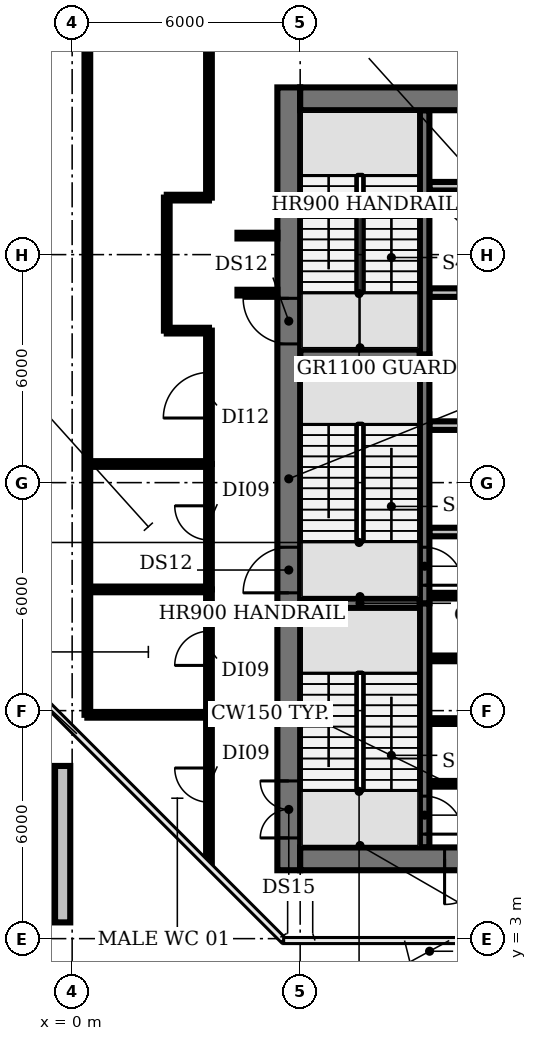
"""IFC4 building model, lengths in metres.
Left out: names, types, materials, properties, quantities, classifications, styles, units other than length and angle.
Written with IfcOpenShell. Run it as: python <this file> out.ifc"""

import sys

from ifc_helpers import new_model, si_unit, direction, frame, frame_2d, origin, place, context, subcontext, project, spatial, rectangle, extrude, element, fill, save


model = new_model("IFC4")
c1 = context("Model", 3, precision=1e-05, world=origin(), true_north=direction((0.0, 1.0)))
c2 = subcontext(c1, "Body", "Model", "MODEL_VIEW")
j1 = project(units=[si_unit("LENGTHUNIT", "METRE"), si_unit("PLANEANGLEUNIT", "RADIAN")], contexts=[c1])
p1 = place(None, origin())
s1 = spatial("IfcSite", under=j1, at=p1, CompositionType="ELEMENT")
p2 = place(p1, origin())
s2 = spatial("IfcBuilding", under=s1, at=p2, CompositionType="ELEMENT")
p3 = place(p2, frame((0.0, 0.0, 197.0)))
s3 = spatial("IfcBuildingStorey", under=s2, at=p3, CompositionType="ELEMENT", Elevation=197.0)
p4 = place(p3, frame((-0.25, 3.427, 0.0), z_axis=(0.0, 0.0, 1.0), x_axis=(0.0, 1.0, 0.0)))
e1 = element("IfcWall", 1, at=p4, inside=s3, PredefinedType="SOLIDWALL", context=c2, shape_type="SweptSolid", body=[
    extrude(rectangle(XDim=4.117, YDim=0.4, at=frame_2d((2.059, 0.0))), origin(), (0.0, 0.0, 1.0), 0.6),
])
for number, where, z_axis, x_axis in (
    (2, (9.4, 7.075, 0.0), (0.0, 0.0, 1.0), (1.0, 0.0, 0.0)),
    (3, (9.4, 8.725, 0.0), (0.0, 0.0, 1.0), (1.0, 0.0, 0.0)),
    (4, (9.4, 10.375, 0.0), (0.0, 0.0, 1.0), (1.0, 0.0, 0.0)),
):
    element("IfcWall", number, at=place(p3, frame(where, z_axis=z_axis, x_axis=x_axis)), inside=s3, PredefinedType="SHEAR", context=c2, shape_type="SweptSolid", body=[
        extrude(rectangle(XDim=1.05, YDim=0.15, at=frame_2d((0.525, 0.0))), origin(), (0.0, 0.0, 1.0), 8.05),
    ])
p5 = place(p3, frame((6.0, 11.825, 0.0), z_axis=(0.0, 0.0, 1.0), x_axis=(1.0, 0.0, 0.0)))
e5 = element("IfcWall", 5, at=p5, inside=s3, PredefinedType="SHEAR", context=c2, shape_type="SweptSolid", body=[
    extrude(rectangle(XDim=3.15, YDim=0.25, at=frame_2d((1.575, 0.0))), origin(), (0.0, 0.0, 1.0), 8.05),
])
p6 = place(p3, frame((9.4, 12.025, 0.0), z_axis=(0.0, 0.0, 1.0), x_axis=(1.0, 0.0, 0.0)))
e6 = element("IfcWall", 6, at=p6, inside=s3, PredefinedType="SHEAR", context=c2, shape_type="SweptSolid", body=[
    extrude(rectangle(XDim=1.05, YDim=0.15, at=frame_2d((0.525, 0.0))), origin(), (0.0, 0.0, 1.0), 8.05),
])
p7 = place(p3, frame((9.4, 13.7, 0.0), z_axis=(0.0, 0.0, 1.0), x_axis=(1.0, 0.0, 0.0)))
e7 = element("IfcWall", 7, at=p7, inside=s3, PredefinedType="PARTITIONING", context=c2, shape_type="SweptSolid", body=[
    extrude(rectangle(XDim=4.0, YDim=0.225, at=frame_2d((2.0, 0.0))), origin(), (0.0, 0.0, 1.0), 8.05),
])
p8 = place(p3, frame((9.4, 16.5, 0.0), z_axis=(0.0, 0.0, 1.0), x_axis=(1.0, 0.0, 0.0)))
e8 = element("IfcWall", 8, at=p8, inside=s3, PredefinedType="PARTITIONING", context=c2, shape_type="SweptSolid", body=[
    extrude(rectangle(XDim=14.6, YDim=0.225, at=frame_2d((7.3, 0.0))), origin(), (0.0, 0.0, 1.0), 8.05),
])
p9 = place(p8, frame((1.6, 0.0, 0.0)))
e9 = element("IfcOpeningElement", 9, at=p9, cuts=e8, PredefinedType="OPENING", context=c2, shape_type="SweptSolid", body=[
    extrude(rectangle(XDim=1.0, YDim=2.1, at=frame_2d((0.5, 1.05))), frame((0.0, 0.123, 0.0), z_axis=(0.0, -1.0, 0.0), x_axis=(1.0, 0.0, 0.0)), (0.0, 0.0, 1.0), 0.245),
])
p10 = place(p8, frame((5.125, 0.0, 0.0)))
e10 = element("IfcOpeningElement", 10, at=p10, cuts=e8, PredefinedType="OPENING", context=c2, shape_type="SweptSolid", body=[
    extrude(rectangle(XDim=0.9, YDim=2.1, at=frame_2d((0.45, 1.05))), frame((0.0, 0.123, 0.0), z_axis=(0.0, -1.0, 0.0), x_axis=(1.0, 0.0, 0.0)), (0.0, 0.0, 1.0), 0.245),
])
p11 = place(p8, frame((7.675, 0.0, 0.0)))
e11 = element("IfcOpeningElement", 11, at=p11, cuts=e8, PredefinedType="OPENING", context=c2, shape_type="SweptSolid", body=[
    extrude(rectangle(XDim=0.9, YDim=2.1, at=frame_2d((0.45, 1.05))), frame((0.0, 0.123, 0.0), z_axis=(0.0, -1.0, 0.0), x_axis=(1.0, 0.0, 0.0)), (0.0, 0.0, 1.0), 0.245),
])
p12 = place(p8, frame((9.775, 0.0, 0.0)))
e12 = element("IfcOpeningElement", 12, at=p12, cuts=e8, PredefinedType="OPENING", context=c2, shape_type="SweptSolid", body=[
    extrude(rectangle(XDim=0.9, YDim=2.1, at=frame_2d((0.45, 1.05))), frame((0.0, 0.123, 0.0), z_axis=(0.0, -1.0, 0.0), x_axis=(1.0, 0.0, 0.0)), (0.0, 0.0, 1.0), 0.245),
])
p13 = place(p8, frame((11.647, 0.0, 0.0)))
e13 = element("IfcOpeningElement", 13, at=p13, cuts=e8, PredefinedType="OPENING", context=c2, shape_type="SweptSolid", body=[
    extrude(rectangle(XDim=0.9, YDim=2.1, at=frame_2d((0.45, 1.05))), frame((0.0, 0.123, 0.0), z_axis=(0.0, -1.0, 0.0), x_axis=(1.0, 0.0, 0.0)), (0.0, 0.0, 1.0), 0.245),
])
p14 = place(p8, frame((13.423, 0.0, 0.0)))
e14 = element("IfcOpeningElement", 14, at=p14, cuts=e8, PredefinedType="OPENING", context=c2, shape_type="SweptSolid", body=[
    extrude(rectangle(XDim=0.9, YDim=2.1, at=frame_2d((0.45, 1.05))), frame((0.0, 0.123, 0.0), z_axis=(0.0, -1.0, 0.0), x_axis=(1.0, 0.0, 0.0)), (0.0, 0.0, 1.0), 0.245),
])
p15 = place(p3, frame((6.0, 18.375, 0.0), z_axis=(0.0, 0.0, 1.0), x_axis=(1.0, 0.0, 0.0)))
e15 = element("IfcWall", 15, at=p15, inside=s3, PredefinedType="SHEAR", context=c2, shape_type="SweptSolid", body=[
    extrude(rectangle(XDim=3.15, YDim=0.25, at=frame_2d((1.575, 0.0))), origin(), (0.0, 0.0, 1.0), 8.05),
])
p16 = place(p3, frame((24.0, 20.0, 0.0), z_axis=(0.0, 0.0, 1.0), x_axis=(-1.0, 0.0, 0.0)))
e16 = element("IfcWall", 16, at=p16, inside=s3, PredefinedType="PARTITIONING", context=c2, shape_type="SweptSolid", body=[
    extrude(rectangle(XDim=14.6, YDim=0.225, at=frame_2d((7.3, 0.0))), origin(), (0.0, 0.0, 1.0), 8.05),
])
p17 = place(p16, frame((12.75, 0.0, 0.0)))
e17 = element("IfcOpeningElement", 17, at=p17, cuts=e16, PredefinedType="OPENING", context=c2, shape_type="SweptSolid", body=[
    extrude(rectangle(XDim=1.1, YDim=2.1, at=frame_2d((0.55, 1.05))), frame((0.0, 0.123, 0.0), z_axis=(0.0, -1.0, 0.0), x_axis=(1.0, 0.0, 0.0)), (0.0, 0.0, 1.0), 0.245),
])
p18 = place(p16, frame((9.95, 0.0, 0.0)))
e18 = element("IfcOpeningElement", 18, at=p18, cuts=e16, PredefinedType="OPENING", context=c2, shape_type="SweptSolid", body=[
    extrude(rectangle(XDim=1.1, YDim=2.1, at=frame_2d((0.55, 1.05))), frame((0.0, 0.123, 0.0), z_axis=(0.0, -1.0, 0.0), x_axis=(1.0, 0.0, 0.0)), (0.0, 0.0, 1.0), 0.245),
])
p19 = place(p16, frame((7.15, 0.0, 0.0)))
e19 = element("IfcOpeningElement", 19, at=p19, cuts=e16, PredefinedType="OPENING", context=c2, shape_type="SweptSolid", body=[
    extrude(rectangle(XDim=1.1, YDim=2.1, at=frame_2d((0.55, 1.05))), frame((0.0, 0.123, 0.0), z_axis=(0.0, -1.0, 0.0), x_axis=(1.0, 0.0, 0.0)), (0.0, 0.0, 1.0), 0.245),
])
p20 = place(p16, frame((4.35, 0.0, 0.0)))
e20 = element("IfcOpeningElement", 20, at=p20, cuts=e16, PredefinedType="OPENING", context=c2, shape_type="SweptSolid", body=[
    extrude(rectangle(XDim=1.1, YDim=2.1, at=frame_2d((0.55, 1.05))), frame((0.0, 0.123, 0.0), z_axis=(0.0, -1.0, 0.0), x_axis=(1.0, 0.0, 0.0)), (0.0, 0.0, 1.0), 0.245),
])
p21 = place(p16, frame((2.137, 0.0, 0.0)))
e21 = element("IfcOpeningElement", 21, at=p21, cuts=e16, PredefinedType="OPENING", context=c2, shape_type="SweptSolid", body=[
    extrude(rectangle(XDim=0.9, YDim=2.1, at=frame_2d((0.45, 1.05))), frame((0.0, 0.123, 0.0), z_axis=(0.0, -1.0, 0.0), x_axis=(1.0, 0.0, 0.0)), (0.0, 0.0, 1.0), 0.245),
])
p22 = place(p16, frame((0.363, 0.0, 0.0)))
e22 = element("IfcOpeningElement", 22, at=p22, cuts=e16, PredefinedType="OPENING", context=c2, shape_type="SweptSolid", body=[
    extrude(rectangle(XDim=0.9, YDim=2.1, at=frame_2d((0.45, 1.05))), frame((0.0, 0.123, 0.0), z_axis=(0.0, -1.0, 0.0), x_axis=(1.0, 0.0, 0.0)), (0.0, 0.0, 1.0), 0.245),
])
p23 = place(p3, frame((9.4, 22.8, 0.0), z_axis=(0.0, 0.0, 1.0), x_axis=(1.0, 0.0, 0.0)))
e23 = element("IfcWall", 23, at=p23, inside=s3, PredefinedType="PARTITIONING", context=c2, shape_type="SweptSolid", body=[
    extrude(rectangle(XDim=14.6, YDim=0.225, at=frame_2d((7.3, 0.0))), origin(), (0.0, 0.0, 1.0), 8.05),
])
p24 = place(p3, frame((9.275, 11.825, 0.0), z_axis=(0.0, 0.0, 1.0), x_axis=(0.0, -1.0, 0.0)))
e24 = element("IfcWall", 24, at=p24, inside=s3, PredefinedType="SHEAR", context=c2, shape_type="SweptSolid", body=[
    extrude(rectangle(XDim=6.425, YDim=0.25, at=frame_2d((3.212, 0.0))), origin(), (0.0, 0.0, 1.0), 8.05),
])
p25 = place(p24, frame((5.075, 0.0, 0.0)))
e25 = element("IfcOpeningElement", 25, at=p25, cuts=e24, PredefinedType="OPENING", context=c2, shape_type="SweptSolid", body=[
    extrude(rectangle(XDim=1.0, YDim=2.1, at=frame_2d((0.5, 1.05))), frame((0.0, 0.135, 0.0), z_axis=(0.0, -1.0, 0.0), x_axis=(1.0, 0.0, 0.0)), (0.0, 0.0, 1.0), 0.27),
])
p26 = place(p3, frame((9.275, 18.375, 0.0), z_axis=(0.0, 0.0, 1.0), x_axis=(0.0, -1.0, 0.0)))
e26 = element("IfcWall", 26, at=p26, inside=s3, PredefinedType="SHEAR", context=c2, shape_type="SweptSolid", body=[
    extrude(rectangle(XDim=6.55, YDim=0.25, at=frame_2d((3.275, 0.0))), origin(), (0.0, 0.0, 1.0), 8.05),
])
p27 = place(p26, frame((5.075, 0.0, 0.0)))
e27 = element("IfcOpeningElement", 27, at=p27, cuts=e26, PredefinedType="OPENING", context=c2, shape_type="SweptSolid", body=[
    extrude(rectangle(XDim=1.0, YDim=2.1, at=frame_2d((0.5, 1.05))), frame((0.0, 0.135, 0.0), z_axis=(0.0, -1.0, 0.0), x_axis=(1.0, 0.0, 0.0)), (0.0, 0.0, 1.0), 0.27),
])
p28 = place(p3, frame((9.275, 18.375, 0.0), z_axis=(0.0, 0.0, 1.0), x_axis=(0.0, 1.0, 0.0)))
e28 = element("IfcWall", 28, at=p28, inside=s3, PredefinedType="SHEAR", context=c2, shape_type="SweptSolid", body=[
    extrude(rectangle(XDim=6.425, YDim=0.25, at=frame_2d((3.212, 0.0))), origin(), (0.0, 0.0, 1.0), 8.05),
])
p29 = place(p3, frame((5.7, 4.8, 0.0), z_axis=(0.0, 0.0, 1.0), x_axis=(0.0, 1.0, 0.0)))
e29 = element("IfcWall", 29, at=p29, inside=s3, PredefinedType="SHEAR", context=c2, shape_type="SweptSolid", body=[
    extrude(rectangle(XDim=20.6, YDim=0.6, at=frame_2d((10.3, 0.0))), origin(), (0.0, 0.0, 1.0), 8.05),
])
p30 = place(p29, frame((0.85, 0.0, 0.0)))
e30 = element("IfcOpeningElement", 30, at=p30, cuts=e29, PredefinedType="OPENING", context=c2, shape_type="SweptSolid", body=[
    extrude(rectangle(XDim=1.5, YDim=2.1, at=frame_2d((0.75, 1.05))), frame((0.0, 0.31, 0.0), z_axis=(0.0, -1.0, 0.0), x_axis=(1.0, 0.0, 0.0)), (0.0, 0.0, 1.0), 0.62),
])
p31 = place(p29, frame((7.3, 0.0, 0.0)))
e31 = element("IfcOpeningElement", 31, at=p31, cuts=e29, PredefinedType="OPENING", context=c2, shape_type="SweptSolid", body=[
    extrude(rectangle(XDim=1.2, YDim=2.1, at=frame_2d((0.6, 1.05))), frame((0.0, 0.31, 0.0), z_axis=(0.0, -1.0, 0.0), x_axis=(1.0, 0.0, 0.0)), (0.0, 0.0, 1.0), 0.62),
])
p32 = place(p29, frame((13.85, 0.0, 0.0)))
e32 = element("IfcOpeningElement", 32, at=p32, cuts=e29, PredefinedType="OPENING", context=c2, shape_type="SweptSolid", body=[
    extrude(rectangle(XDim=1.2, YDim=2.1, at=frame_2d((0.6, 1.05))), frame((0.0, 0.31, 0.0), z_axis=(0.0, -1.0, 0.0), x_axis=(1.0, 0.0, 0.0)), (0.0, 0.0, 1.0), 0.62),
])
p33 = place(p3, frame((24.0, 5.1, 0.0), z_axis=(0.0, 0.0, 1.0), x_axis=(-1.0, 0.0, 0.0)))
e33 = element("IfcWall", 33, at=p33, inside=s3, PredefinedType="SHEAR", context=c2, shape_type="SweptSolid", body=[
    extrude(rectangle(XDim=18.0, YDim=0.6, at=frame_2d((9.0, 0.0))), origin(), (0.0, 0.0, 1.0), 8.05),
])
p34 = place(p33, frame((13.0, 0.0, 0.0)))
e34 = element("IfcOpeningElement", 34, at=p34, cuts=e33, PredefinedType="OPENING", context=c2, shape_type="SweptSolid", body=[
    extrude(rectangle(XDim=1.2, YDim=2.1, at=frame_2d((0.6, 1.05))), frame((0.0, 0.31, 0.0), z_axis=(0.0, -1.0, 0.0), x_axis=(1.0, 0.0, 0.0)), (0.0, 0.0, 1.0), 0.62),
])
p35 = place(p33, frame((4.9, 0.0, 0.0)))
e35 = element("IfcOpeningElement", 35, at=p35, cuts=e33, PredefinedType="OPENING", context=c2, shape_type="SweptSolid", body=[
    extrude(rectangle(XDim=1.0, YDim=2.1, at=frame_2d((0.5, 1.05))), frame((0.0, 0.31, 0.0), z_axis=(0.0, -1.0, 0.0), x_axis=(1.0, 0.0, 0.0)), (0.0, 0.0, 1.0), 0.62),
])
p36 = place(p3, frame((6.0, 25.1, 0.0), z_axis=(0.0, 0.0, 1.0), x_axis=(1.0, 0.0, 0.0)))
e36 = element("IfcWall", 36, at=p36, inside=s3, PredefinedType="SHEAR", context=c2, shape_type="SweptSolid", body=[
    extrude(rectangle(XDim=18.0, YDim=0.6, at=frame_2d((9.0, 0.0))), origin(), (0.0, 0.0, 1.0), 8.05),
])
p37 = place(p3, frame((0.4, 8.89, 0.0), z_axis=(0.0, 0.0, 1.0), x_axis=(0.0, 1.0, 0.0)))
e37 = element("IfcWall", 37, at=p37, inside=s3, PredefinedType="PARTITIONING", context=c2, shape_type="SweptSolid", body=[
    extrude(rectangle(XDim=54.11, YDim=0.15, at=frame_2d((27.055, 0.0))), origin(), (0.0, 0.0, 1.0), 6.33),
])
for number, where, z_axis, x_axis in (
    (38, (0.4, 8.89, 0.0), (0.0, 0.0, 1.0), (1.0, 0.0, 0.0)),
    (39, (0.4, 12.19, 0.0), (0.0, 0.0, 1.0), (1.0, 0.0, 0.0)),
    (40, (0.4, 15.49, 0.0), (0.0, 0.0, 1.0), (1.0, 0.0, 0.0)),
):
    element("IfcWall", number, at=place(p3, frame(where, z_axis=z_axis, x_axis=x_axis)), inside=s3, PredefinedType="PARTITIONING", context=c2, shape_type="SweptSolid", body=[
        extrude(rectangle(XDim=3.2, YDim=0.15, at=frame_2d((1.6, 0.0))), origin(), (0.0, 0.0, 1.0), 6.33),
    ])
p38 = place(p3, frame((2.49, 19.0, 0.0), z_axis=(0.0, 0.0, 1.0), x_axis=(0.0, 1.0, 0.0)))
e41 = element("IfcWall", 41, at=p38, inside=s3, PredefinedType="PARTITIONING", context=c2, shape_type="SweptSolid", body=[
    extrude(rectangle(XDim=3.5, YDim=0.15, at=frame_2d((1.75, 0.0))), origin(), (0.0, 0.0, 1.0), 6.33),
])
for number, where, z_axis, x_axis in (
    (42, (2.49, 19.0, 0.0), (0.0, 0.0, 1.0), (1.0, 0.0, 0.0)),
    (43, (2.49, 22.5, 0.0), (0.0, 0.0, 1.0), (1.0, 0.0, 0.0)),
):
    element("IfcWall", number, at=place(p3, frame(where, z_axis=z_axis, x_axis=x_axis)), inside=s3, PredefinedType="PARTITIONING", context=c2, shape_type="SweptSolid", body=[
        extrude(rectangle(XDim=1.11, YDim=0.15, at=frame_2d((0.555, 0.0))), origin(), (0.0, 0.0, 1.0), 6.33),
    ])
p39 = place(p3, frame((3.6, 4.99, 0.0), z_axis=(0.0, 0.0, 1.0), x_axis=(0.0, 1.0, 0.0)))
e44 = element("IfcWall", 44, at=p39, inside=s3, PredefinedType="PARTITIONING", context=c2, shape_type="SweptSolid", body=[
    extrude(rectangle(XDim=3.9, YDim=0.15, at=frame_2d((1.95, 0.0))), origin(), (0.0, 0.0, 1.0), 6.33),
])
p40 = place(p39, frame((1.6, 0.0, 0.0)))
e45 = element("IfcOpeningElement", 45, at=p40, cuts=e44, PredefinedType="OPENING", context=c2, shape_type="SweptSolid", body=[
    extrude(rectangle(XDim=0.9, YDim=2.1, at=frame_2d((0.45, 1.05))), frame((0.0, 0.085, 0.0), z_axis=(0.0, -1.0, 0.0), x_axis=(1.0, 0.0, 0.0)), (0.0, 0.0, 1.0), 0.17),
])
p41 = place(p3, frame((3.6, 8.89, 0.0), z_axis=(0.0, 0.0, 1.0), x_axis=(0.0, 1.0, 0.0)))
e46 = element("IfcWall", 46, at=p41, inside=s3, PredefinedType="PARTITIONING", context=c2, shape_type="SweptSolid", body=[
    extrude(rectangle(XDim=3.3, YDim=0.15, at=frame_2d((1.65, 0.0))), origin(), (0.0, 0.0, 1.0), 6.33),
])
p42 = place(p41, frame((1.3, 0.0, 0.0)))
e47 = element("IfcOpeningElement", 47, at=p42, cuts=e46, PredefinedType="OPENING", context=c2, shape_type="SweptSolid", body=[
    extrude(rectangle(XDim=0.9, YDim=2.1, at=frame_2d((0.45, 1.05))), frame((0.0, 0.085, 0.0), z_axis=(0.0, -1.0, 0.0), x_axis=(1.0, 0.0, 0.0)), (0.0, 0.0, 1.0), 0.17),
])
p43 = place(p3, frame((3.6, 12.19, 0.0), z_axis=(0.0, 0.0, 1.0), x_axis=(0.0, 1.0, 0.0)))
e48 = element("IfcWall", 48, at=p43, inside=s3, PredefinedType="PARTITIONING", context=c2, shape_type="SweptSolid", body=[
    extrude(rectangle(XDim=3.3, YDim=0.15, at=frame_2d((1.65, 0.0))), origin(), (0.0, 0.0, 1.0), 6.33),
])
p44 = place(p43, frame((1.3, 0.0, 0.0)))
e49 = element("IfcOpeningElement", 49, at=p44, cuts=e48, PredefinedType="OPENING", context=c2, shape_type="SweptSolid", body=[
    extrude(rectangle(XDim=0.9, YDim=2.1, at=frame_2d((0.45, 1.05))), frame((0.0, 0.085, 0.0), z_axis=(0.0, -1.0, 0.0), x_axis=(1.0, 0.0, 0.0)), (0.0, 0.0, 1.0), 0.17),
])
p45 = place(p3, frame((3.6, 15.49, 0.0), z_axis=(0.0, 0.0, 1.0), x_axis=(0.0, 1.0, 0.0)))
e50 = element("IfcWall", 50, at=p45, inside=s3, PredefinedType="PARTITIONING", context=c2, shape_type="SweptSolid", body=[
    extrude(rectangle(XDim=3.51, YDim=0.15, at=frame_2d((1.755, 0.0))), origin(), (0.0, 0.0, 1.0), 6.33),
])
p46 = place(p45, frame((1.21, 0.0, 0.0)))
e51 = element("IfcOpeningElement", 51, at=p46, cuts=e50, PredefinedType="OPENING", context=c2, shape_type="SweptSolid", body=[
    extrude(rectangle(XDim=1.2, YDim=2.1, at=frame_2d((0.6, 1.05))), frame((0.0, 0.085, 0.0), z_axis=(0.0, -1.0, 0.0), x_axis=(1.0, 0.0, 0.0)), (0.0, 0.0, 1.0), 0.17),
])
p47 = place(p3, frame((3.6, 22.5, 0.0), z_axis=(0.0, 0.0, 1.0), x_axis=(0.0, 1.0, 0.0)))
e52 = element("IfcWall", 52, at=p47, inside=s3, PredefinedType="PARTITIONING", context=c2, shape_type="SweptSolid", body=[
    extrude(rectangle(XDim=4.7, YDim=0.15, at=frame_2d((2.35, 0.0))), origin(), (0.0, 0.0, 1.0), 6.33),
])
for number, where, z_axis, x_axis in (
    (53, (4.35, 20.0, 0.0), (0.0, 0.0, 1.0), (1.0, 0.0, 0.0)),
    (54, (4.35, 21.5, 0.0), (0.0, 0.0, 1.0), (1.0, 0.0, 0.0)),
):
    element("IfcWall", number, at=place(p3, frame(where, z_axis=z_axis, x_axis=x_axis)), inside=s3, PredefinedType="PARTITIONING", context=c2, shape_type="SweptSolid", body=[
        extrude(rectangle(XDim=1.05, YDim=0.15, at=frame_2d((0.525, 0.0))), origin(), (0.0, 0.0, 1.0), 6.33),
    ])
p48 = place(p25, origin())
e55 = element("IfcDoor", 55, at=p48, inside=s3, OperationType="SINGLE_SWING_RIGHT", PredefinedType="DOOR", context=c2, shape_type="SweptSolid", body=[
    extrude(rectangle(XDim=1.0, YDim=2.1, at=frame_2d((0.5, 1.05))), frame((0.0, 0.025, 0.0), z_axis=(0.0, -1.0, 0.0), x_axis=(1.0, 0.0, 0.0)), (0.0, 0.0, 1.0), 0.05),
])
fill(e25, e55)
p49 = place(p27, origin())
e56 = element("IfcDoor", 56, at=p49, inside=s3, OperationType="SINGLE_SWING_RIGHT", PredefinedType="DOOR", context=c2, shape_type="SweptSolid", body=[
    extrude(rectangle(XDim=1.0, YDim=2.1, at=frame_2d((0.5, 1.05))), frame((0.0, 0.025, 0.0), z_axis=(0.0, -1.0, 0.0), x_axis=(1.0, 0.0, 0.0)), (0.0, 0.0, 1.0), 0.05),
])
fill(e27, e56)
p50 = place(p30, origin())
e57 = element("IfcDoor", 57, at=p50, inside=s3, OperationType="DOUBLE_DOOR_SINGLE_SWING", PredefinedType="DOOR", context=c2, shape_type="SweptSolid", body=[
    extrude(rectangle(XDim=1.5, YDim=2.1, at=frame_2d((0.75, 1.05))), frame((0.0, 0.025, 0.0), z_axis=(0.0, -1.0, 0.0), x_axis=(1.0, 0.0, 0.0)), (0.0, 0.0, 1.0), 0.05),
])
fill(e30, e57)
p51 = place(p31, origin())
e58 = element("IfcDoor", 58, at=p51, inside=s3, OperationType="SINGLE_SWING_LEFT", PredefinedType="DOOR", context=c2, shape_type="SweptSolid", body=[
    extrude(rectangle(XDim=1.2, YDim=2.1, at=frame_2d((0.6, 1.05))), frame((0.0, 0.025, 0.0), z_axis=(0.0, -1.0, 0.0), x_axis=(1.0, 0.0, 0.0)), (0.0, 0.0, 1.0), 0.05),
])
fill(e31, e58)
p52 = place(p32, origin())
e59 = element("IfcDoor", 59, at=p52, inside=s3, OperationType="SINGLE_SWING_RIGHT", PredefinedType="DOOR", context=c2, shape_type="SweptSolid", body=[
    extrude(rectangle(XDim=1.2, YDim=2.1, at=frame_2d((0.6, 1.05))), frame((0.0, 0.025, 0.0), z_axis=(0.0, -1.0, 0.0), x_axis=(1.0, 0.0, 0.0)), (0.0, 0.0, 1.0), 0.05),
])
fill(e32, e59)
p53 = place(p34, origin())
e60 = element("IfcDoor", 60, at=p53, inside=s3, OperationType="SINGLE_SWING_RIGHT", PredefinedType="DOOR", context=c2, shape_type="SweptSolid", body=[
    extrude(rectangle(XDim=1.2, YDim=2.1, at=frame_2d((0.6, 1.05))), frame((0.0, 0.025, 0.0), z_axis=(0.0, -1.0, 0.0), x_axis=(1.0, 0.0, 0.0)), (0.0, 0.0, 1.0), 0.05),
])
fill(e34, e60)
p54 = place(p40, origin())
e61 = element("IfcDoor", 61, at=p54, inside=s3, OperationType="SINGLE_SWING_RIGHT", PredefinedType="DOOR", context=c2, shape_type="SweptSolid", body=[
    extrude(rectangle(XDim=0.9, YDim=2.1, at=frame_2d((0.45, 1.05))), frame((0.0, 0.025, 0.0), z_axis=(0.0, -1.0, 0.0), x_axis=(1.0, 0.0, 0.0)), (0.0, 0.0, 1.0), 0.05),
])
fill(e45, e61)
p55 = place(p42, origin())
e62 = element("IfcDoor", 62, at=p55, inside=s3, OperationType="SINGLE_SWING_LEFT", PredefinedType="DOOR", context=c2, shape_type="SweptSolid", body=[
    extrude(rectangle(XDim=0.9, YDim=2.1, at=frame_2d((0.45, 1.05))), frame((0.0, 0.025, 0.0), z_axis=(0.0, -1.0, 0.0), x_axis=(1.0, 0.0, 0.0)), (0.0, 0.0, 1.0), 0.05),
])
fill(e47, e62)
p56 = place(p44, origin())
e63 = element("IfcDoor", 63, at=p56, inside=s3, OperationType="SINGLE_SWING_RIGHT", PredefinedType="DOOR", context=c2, shape_type="SweptSolid", body=[
    extrude(rectangle(XDim=0.9, YDim=2.1, at=frame_2d((0.45, 1.05))), frame((0.0, 0.025, 0.0), z_axis=(0.0, -1.0, 0.0), x_axis=(1.0, 0.0, 0.0)), (0.0, 0.0, 1.0), 0.05),
])
fill(e49, e63)
p57 = place(p46, origin())
e64 = element("IfcDoor", 64, at=p57, inside=s3, OperationType="SINGLE_SWING_LEFT", PredefinedType="DOOR", context=c2, shape_type="SweptSolid", body=[
    extrude(rectangle(XDim=1.2, YDim=2.1, at=frame_2d((0.6, 1.05))), frame((0.0, 0.025, 0.0), z_axis=(0.0, -1.0, 0.0), x_axis=(1.0, 0.0, 0.0)), (0.0, 0.0, 1.0), 0.05),
])
fill(e51, e64)
save(model, sys.argv[1])
